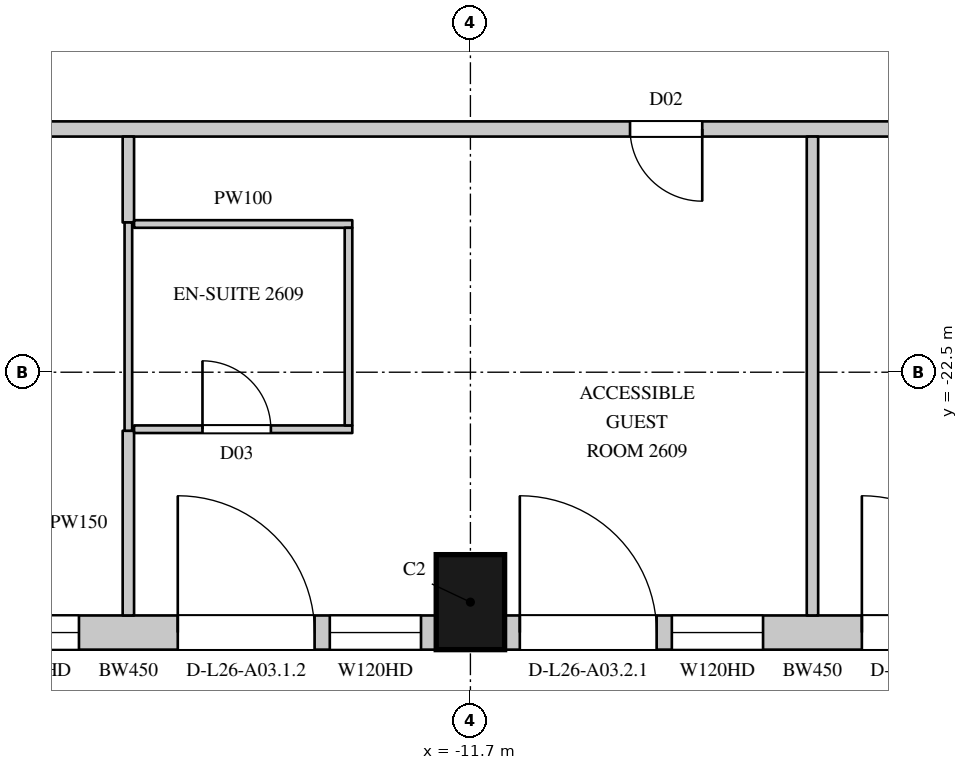
"""IFC4 building model, lengths in metres.
Left out: names, types, materials, properties, quantities, classifications, styles, units other than length and angle.
Written with IfcOpenShell. Run it as: python <this file> out.ifc"""

import sys

from ifc_helpers import new_model, si_unit, direction, frame, frame_2d, origin, origin_2d, place, context, subcontext, project, spatial, rectangle, extrude, element, fill, save


model = new_model("IFC4")
c1 = context("Model", 3, precision=1e-05, world=origin(), true_north=direction((0.0, 1.0)))
c2 = subcontext(c1, "Body", "Model", "MODEL_VIEW")
j1 = project(units=[si_unit("LENGTHUNIT", "METRE"), si_unit("PLANEANGLEUNIT", "RADIAN")], contexts=[c1])
p1 = place(None, origin())
s1 = spatial("IfcSite", under=j1, at=p1, CompositionType="ELEMENT")
p2 = place(p1, origin())
s2 = spatial("IfcBuilding", under=s1, at=p2, CompositionType="ELEMENT")
p3 = place(p2, frame((0.0, 0.0, 123.9)))
s3 = spatial("IfcBuildingStorey", under=s2, at=p3, CompositionType="ELEMENT", Elevation=123.9)
p4 = place(p3, frame((-11.7, -25.525, 0.0), z_axis=(0.0, 0.0, 1.0), x_axis=(1.0, 0.0, 0.0)))
e1 = element("IfcColumn", 1, at=p4, inside=s3, PredefinedType="COLUMN", context=c2, shape_type="SweptSolid", body=[
    extrude(rectangle(XDim=0.9, YDim=1.25, at=origin_2d()), origin(), (0.0, 0.0, 1.0), 3.6),
])
p5 = place(p3, frame((-20.25, -25.925, 0.0), z_axis=(0.0, 0.0, 1.0), x_axis=(1.0, 0.0, 0.0)))
e2 = element("IfcWall", 2, at=p5, inside=s3, PredefinedType="SOLIDWALL", context=c2, shape_type="SweptSolid", body=[
    extrude(rectangle(XDim=8.1, YDim=0.45, at=frame_2d((4.05, 0.0))), origin(), (0.0, 0.0, 1.0), 3.3),
])
p6 = place(p5, frame((0.2, 0.0, 0.0)))
e3 = element("IfcOpeningElement", 3, at=p6, cuts=e2, PredefinedType="OPENING", context=c2, shape_type="SweptSolid", body=[
    extrude(rectangle(XDim=1.8, YDim=2.4, at=frame_2d((0.9, 1.2))), frame((0.0, 0.235, 0.0), z_axis=(0.0, -1.0, 0.0), x_axis=(1.0, 0.0, 0.0)), (0.0, 0.0, 1.0), 0.47),
])
p7 = place(p5, frame((2.2, 0.0, 1.05)))
e4 = element("IfcOpeningElement", 4, at=p7, cuts=e2, PredefinedType="OPENING", context=c2, shape_type="SweptSolid", body=[
    extrude(rectangle(XDim=1.2, YDim=2.0, at=frame_2d((0.6, 1.0))), frame((0.0, 0.235, 0.0), z_axis=(0.0, -1.0, 0.0), x_axis=(1.0, 0.0, 0.0)), (0.0, 0.0, 1.0), 0.47),
])
p8 = place(p5, frame((4.7, 0.0, 0.0)))
e5 = element("IfcOpeningElement", 5, at=p8, cuts=e2, PredefinedType="OPENING", context=c2, shape_type="SweptSolid", body=[
    extrude(rectangle(XDim=1.8, YDim=2.4, at=frame_2d((0.9, 1.2))), frame((0.0, 0.235, 0.0), z_axis=(0.0, -1.0, 0.0), x_axis=(1.0, 0.0, 0.0)), (0.0, 0.0, 1.0), 0.47),
])
p9 = place(p5, frame((6.7, 0.0, 1.05)))
e6 = element("IfcOpeningElement", 6, at=p9, cuts=e2, PredefinedType="OPENING", context=c2, shape_type="SweptSolid", body=[
    extrude(rectangle(XDim=1.2, YDim=2.0, at=frame_2d((0.6, 1.0))), frame((0.0, 0.235, 0.0), z_axis=(0.0, -1.0, 0.0), x_axis=(1.0, 0.0, 0.0)), (0.0, 0.0, 1.0), 0.47),
])
p10 = place(p3, frame((-11.25, -25.925, 0.0), z_axis=(0.0, 0.0, 1.0), x_axis=(1.0, 0.0, 0.0)))
e7 = element("IfcWall", 7, at=p10, inside=s3, PredefinedType="SOLIDWALL", context=c2, shape_type="SweptSolid", body=[
    extrude(rectangle(XDim=8.1, YDim=0.45, at=frame_2d((4.05, 0.0))), origin(), (0.0, 0.0, 1.0), 3.3),
])
p11 = place(p10, frame((0.2, 0.0, 0.0)))
e8 = element("IfcOpeningElement", 8, at=p11, cuts=e7, PredefinedType="OPENING", context=c2, shape_type="SweptSolid", body=[
    extrude(rectangle(XDim=1.8, YDim=2.4, at=frame_2d((0.9, 1.2))), frame((0.0, 0.235, 0.0), z_axis=(0.0, -1.0, 0.0), x_axis=(1.0, 0.0, 0.0)), (0.0, 0.0, 1.0), 0.47),
])
p12 = place(p10, frame((2.2, 0.0, 1.05)))
e9 = element("IfcOpeningElement", 9, at=p12, cuts=e7, PredefinedType="OPENING", context=c2, shape_type="SweptSolid", body=[
    extrude(rectangle(XDim=1.2, YDim=2.0, at=frame_2d((0.6, 1.0))), frame((0.0, 0.235, 0.0), z_axis=(0.0, -1.0, 0.0), x_axis=(1.0, 0.0, 0.0)), (0.0, 0.0, 1.0), 0.47),
])
p13 = place(p10, frame((4.7, 0.0, 0.0)))
e10 = element("IfcOpeningElement", 10, at=p13, cuts=e7, PredefinedType="OPENING", context=c2, shape_type="SweptSolid", body=[
    extrude(rectangle(XDim=1.8, YDim=2.4, at=frame_2d((0.9, 1.2))), frame((0.0, 0.235, 0.0), z_axis=(0.0, -1.0, 0.0), x_axis=(1.0, 0.0, 0.0)), (0.0, 0.0, 1.0), 0.47),
])
p14 = place(p10, frame((6.7, 0.0, 1.05)))
e11 = element("IfcOpeningElement", 11, at=p14, cuts=e7, PredefinedType="OPENING", context=c2, shape_type="SweptSolid", body=[
    extrude(rectangle(XDim=1.2, YDim=2.0, at=frame_2d((0.6, 1.0))), frame((0.0, 0.235, 0.0), z_axis=(0.0, -1.0, 0.0), x_axis=(1.0, 0.0, 0.0)), (0.0, 0.0, 1.0), 0.47),
])
p15 = place(p3, frame((-20.8, -19.3, 0.0), z_axis=(0.0, 0.0, 1.0), x_axis=(1.0, 0.0, 0.0)))
e12 = element("IfcWall", 12, at=p15, inside=s3, PredefinedType="PARTITIONING", context=c2, shape_type="SweptSolid", body=[
    extrude(rectangle(XDim=38.6, YDim=0.2, at=frame_2d((19.3, 0.0))), origin(), (0.0, 0.0, 1.0), 3.3),
])
p16 = place(p15, frame((11.2, 0.0, 0.0)))
e13 = element("IfcOpeningElement", 13, at=p16, cuts=e12, PredefinedType="OPENING", context=c2, shape_type="SweptSolid", body=[
    extrude(rectangle(XDim=0.95, YDim=2.2, at=frame_2d((0.475, 1.1))), frame((0.0, 0.11, 0.0), z_axis=(0.0, -1.0, 0.0), x_axis=(1.0, 0.0, 0.0)), (0.0, 0.0, 1.0), 0.22),
])
p17 = place(p15, frame((15.05, 0.0, 0.0)))
e14 = element("IfcOpeningElement", 14, at=p17, cuts=e12, PredefinedType="OPENING", context=c2, shape_type="SweptSolid", body=[
    extrude(rectangle(XDim=0.95, YDim=2.2, at=frame_2d((0.475, 1.1))), frame((0.0, 0.11, 0.0), z_axis=(0.0, -1.0, 0.0), x_axis=(1.0, 0.0, 0.0)), (0.0, 0.0, 1.0), 0.22),
])
p18 = place(p15, frame((29.2, 0.0, 0.0)))
e15 = element("IfcOpeningElement", 15, at=p18, cuts=e12, PredefinedType="OPENING", context=c2, shape_type="SweptSolid", body=[
    extrude(rectangle(XDim=0.95, YDim=2.2, at=frame_2d((0.475, 1.1))), frame((0.0, 0.11, 0.0), z_axis=(0.0, -1.0, 0.0), x_axis=(1.0, 0.0, 0.0)), (0.0, 0.0, 1.0), 0.22),
])
p19 = place(p15, frame((33.05, 0.0, 0.0)))
e16 = element("IfcOpeningElement", 16, at=p19, cuts=e12, PredefinedType="OPENING", context=c2, shape_type="SweptSolid", body=[
    extrude(rectangle(XDim=0.95, YDim=2.2, at=frame_2d((0.475, 1.1))), frame((0.0, 0.11, 0.0), z_axis=(0.0, -1.0, 0.0), x_axis=(1.0, 0.0, 0.0)), (0.0, 0.0, 1.0), 0.22),
])
p20 = place(p3, frame((-16.2, -25.7, 0.0), z_axis=(0.0, 0.0, 1.0), x_axis=(0.0, 1.0, 0.0)))
e17 = element("IfcWall", 17, at=p20, inside=s3, PredefinedType="PARTITIONING", context=c2, shape_type="SweptSolid", body=[
    extrude(rectangle(XDim=2.43, YDim=0.15, at=frame_2d((1.215, 0.0))), origin(), (0.0, 0.0, 1.0), 2.65),
])
p21 = place(p3, frame((-16.2, -20.53, 0.0), z_axis=(0.0, 0.0, 1.0), x_axis=(0.0, 1.0, 0.0)))
e18 = element("IfcWall", 18, at=p21, inside=s3, PredefinedType="PARTITIONING", context=c2, shape_type="SweptSolid", body=[
    extrude(rectangle(XDim=1.13, YDim=0.15, at=frame_2d((0.565, 0.0))), origin(), (0.0, 0.0, 1.0), 2.65),
])
p22 = place(p3, frame((-7.2, -25.7, 0.0), z_axis=(0.0, 0.0, 1.0), x_axis=(0.0, 1.0, 0.0)))
e19 = element("IfcWall", 19, at=p22, inside=s3, PredefinedType="PARTITIONING", context=c2, shape_type="SweptSolid", body=[
    extrude(rectangle(XDim=6.3, YDim=0.15, at=frame_2d((3.15, 0.0))), origin(), (0.0, 0.0, 1.0), 2.65),
])
p23 = place(p3, frame((-16.2, -23.27, 0.0), z_axis=(0.0, 0.0, 1.0), x_axis=(0.0, 1.0, 0.0)))
e20 = element("IfcWall", 20, at=p23, inside=s3, PredefinedType="PARTITIONING", context=c2, shape_type="SweptSolid", body=[
    extrude(rectangle(XDim=2.74, YDim=0.1, at=frame_2d((1.37, 0.0))), origin(), (0.0, 0.0, 1.0), 2.65),
])
p24 = place(p3, frame((-16.125, -23.25, 0.0), z_axis=(0.0, 0.0, 1.0), x_axis=(1.0, 0.0, 0.0)))
e21 = element("IfcWall", 21, at=p24, inside=s3, PredefinedType="PARTITIONING", context=c2, shape_type="SweptSolid", body=[
    extrude(rectangle(XDim=2.871, YDim=0.1, at=frame_2d((1.436, 0.0))), origin(), (0.0, 0.0, 1.0), 3.3),
])
p25 = place(p24, frame((0.9, 0.0, 0.0)))
e22 = element("IfcOpeningElement", 22, at=p25, cuts=e21, PredefinedType="OPENING", context=c2, shape_type="SweptSolid", body=[
    extrude(rectangle(XDim=0.9, YDim=2.2, at=frame_2d((0.45, 1.1))), frame((0.0, 0.06, 0.0), z_axis=(0.0, -1.0, 0.0), x_axis=(1.0, 0.0, 0.0)), (0.0, 0.0, 1.0), 0.12),
])
p26 = place(p3, frame((-16.125, -20.55, 0.0), z_axis=(0.0, 0.0, 1.0), x_axis=(1.0, 0.0, 0.0)))
e23 = element("IfcWall", 23, at=p26, inside=s3, PredefinedType="PARTITIONING", context=c2, shape_type="SweptSolid", body=[
    extrude(rectangle(XDim=2.871, YDim=0.1, at=frame_2d((1.436, 0.0))), origin(), (0.0, 0.0, 1.0), 3.3),
])
p27 = place(p3, frame((-13.304, -23.2, 0.0), z_axis=(0.0, 0.0, 1.0), x_axis=(0.0, 1.0, 0.0)))
e24 = element("IfcWall", 24, at=p27, inside=s3, PredefinedType="PARTITIONING", context=c2, shape_type="SweptSolid", body=[
    extrude(rectangle(XDim=2.6, YDim=0.1, at=frame_2d((1.3, 0.0))), origin(), (0.0, 0.0, 1.0), 3.3),
])
p28 = place(p7, origin())
e25 = element("IfcWindow", 25, at=p28, inside=s3, PartitioningType="SINGLE_PANEL", PredefinedType="WINDOW", context=c2, shape_type="SweptSolid", body=[
    extrude(rectangle(XDim=1.2, YDim=2.0, at=frame_2d((0.6, 1.0))), frame((0.0, 0.135, 0.0), z_axis=(0.0, -1.0, 0.0), x_axis=(1.0, 0.0, 0.0)), (0.0, 0.0, 1.0), 0.06),
])
fill(e4, e25)
p29 = place(p8, origin())
e26 = element("IfcDoor", 26, at=p29, inside=s3, OperationType="SLIDING_TO_LEFT", PredefinedType="DOOR", context=c2, shape_type="SweptSolid", body=[
    extrude(rectangle(XDim=1.8, YDim=2.4, at=frame_2d((0.9, 1.2))), frame((0.0, 0.13, 0.0), z_axis=(0.0, -1.0, 0.0), x_axis=(1.0, 0.0, 0.0)), (0.0, 0.0, 1.0), 0.05),
])
fill(e5, e26)
p30 = place(p9, origin())
e27 = element("IfcWindow", 27, at=p30, inside=s3, PartitioningType="SINGLE_PANEL", PredefinedType="WINDOW", context=c2, shape_type="SweptSolid", body=[
    extrude(rectangle(XDim=1.2, YDim=2.0, at=frame_2d((0.6, 1.0))), frame((0.0, 0.135, 0.0), z_axis=(0.0, -1.0, 0.0), x_axis=(1.0, 0.0, 0.0)), (0.0, 0.0, 1.0), 0.06),
])
fill(e6, e27)
p31 = place(p11, origin())
e28 = element("IfcDoor", 28, at=p31, inside=s3, OperationType="SLIDING_TO_LEFT", PredefinedType="DOOR", context=c2, shape_type="SweptSolid", body=[
    extrude(rectangle(XDim=1.8, YDim=2.4, at=frame_2d((0.9, 1.2))), frame((0.0, 0.13, 0.0), z_axis=(0.0, -1.0, 0.0), x_axis=(1.0, 0.0, 0.0)), (0.0, 0.0, 1.0), 0.05),
])
fill(e8, e28)
p32 = place(p12, origin())
e29 = element("IfcWindow", 29, at=p32, inside=s3, PartitioningType="SINGLE_PANEL", PredefinedType="WINDOW", context=c2, shape_type="SweptSolid", body=[
    extrude(rectangle(XDim=1.2, YDim=2.0, at=frame_2d((0.6, 1.0))), frame((0.0, 0.135, 0.0), z_axis=(0.0, -1.0, 0.0), x_axis=(1.0, 0.0, 0.0)), (0.0, 0.0, 1.0), 0.06),
])
fill(e9, e29)
p33 = place(p13, origin())
e30 = element("IfcDoor", 30, at=p33, inside=s3, OperationType="SLIDING_TO_LEFT", PredefinedType="DOOR", context=c2, shape_type="SweptSolid", body=[
    extrude(rectangle(XDim=1.8, YDim=2.4, at=frame_2d((0.9, 1.2))), frame((0.0, 0.13, 0.0), z_axis=(0.0, -1.0, 0.0), x_axis=(1.0, 0.0, 0.0)), (0.0, 0.0, 1.0), 0.05),
])
fill(e10, e30)
p34 = place(p16, origin())
e31 = element("IfcDoor", 31, at=p34, inside=s3, OperationType="SINGLE_SWING_LEFT", PredefinedType="DOOR", context=c2, shape_type="SweptSolid", body=[
    extrude(rectangle(XDim=0.95, YDim=2.2, at=frame_2d((0.475, 1.1))), frame((0.0, 0.025, 0.0), z_axis=(0.0, -1.0, 0.0), x_axis=(1.0, 0.0, 0.0)), (0.0, 0.0, 1.0), 0.05),
])
fill(e13, e31)
p35 = place(p25, origin())
e32 = element("IfcDoor", 32, at=p35, inside=s3, OperationType="SINGLE_SWING_LEFT", PredefinedType="DOOR", context=c2, shape_type="SweptSolid", body=[
    extrude(rectangle(XDim=0.9, YDim=2.2, at=frame_2d((0.45, 1.1))), frame((0.0, 0.025, 0.0), z_axis=(0.0, -1.0, 0.0), x_axis=(1.0, 0.0, 0.0)), (0.0, 0.0, 1.0), 0.05),
])
fill(e22, e32)
save(model, sys.argv[1])
